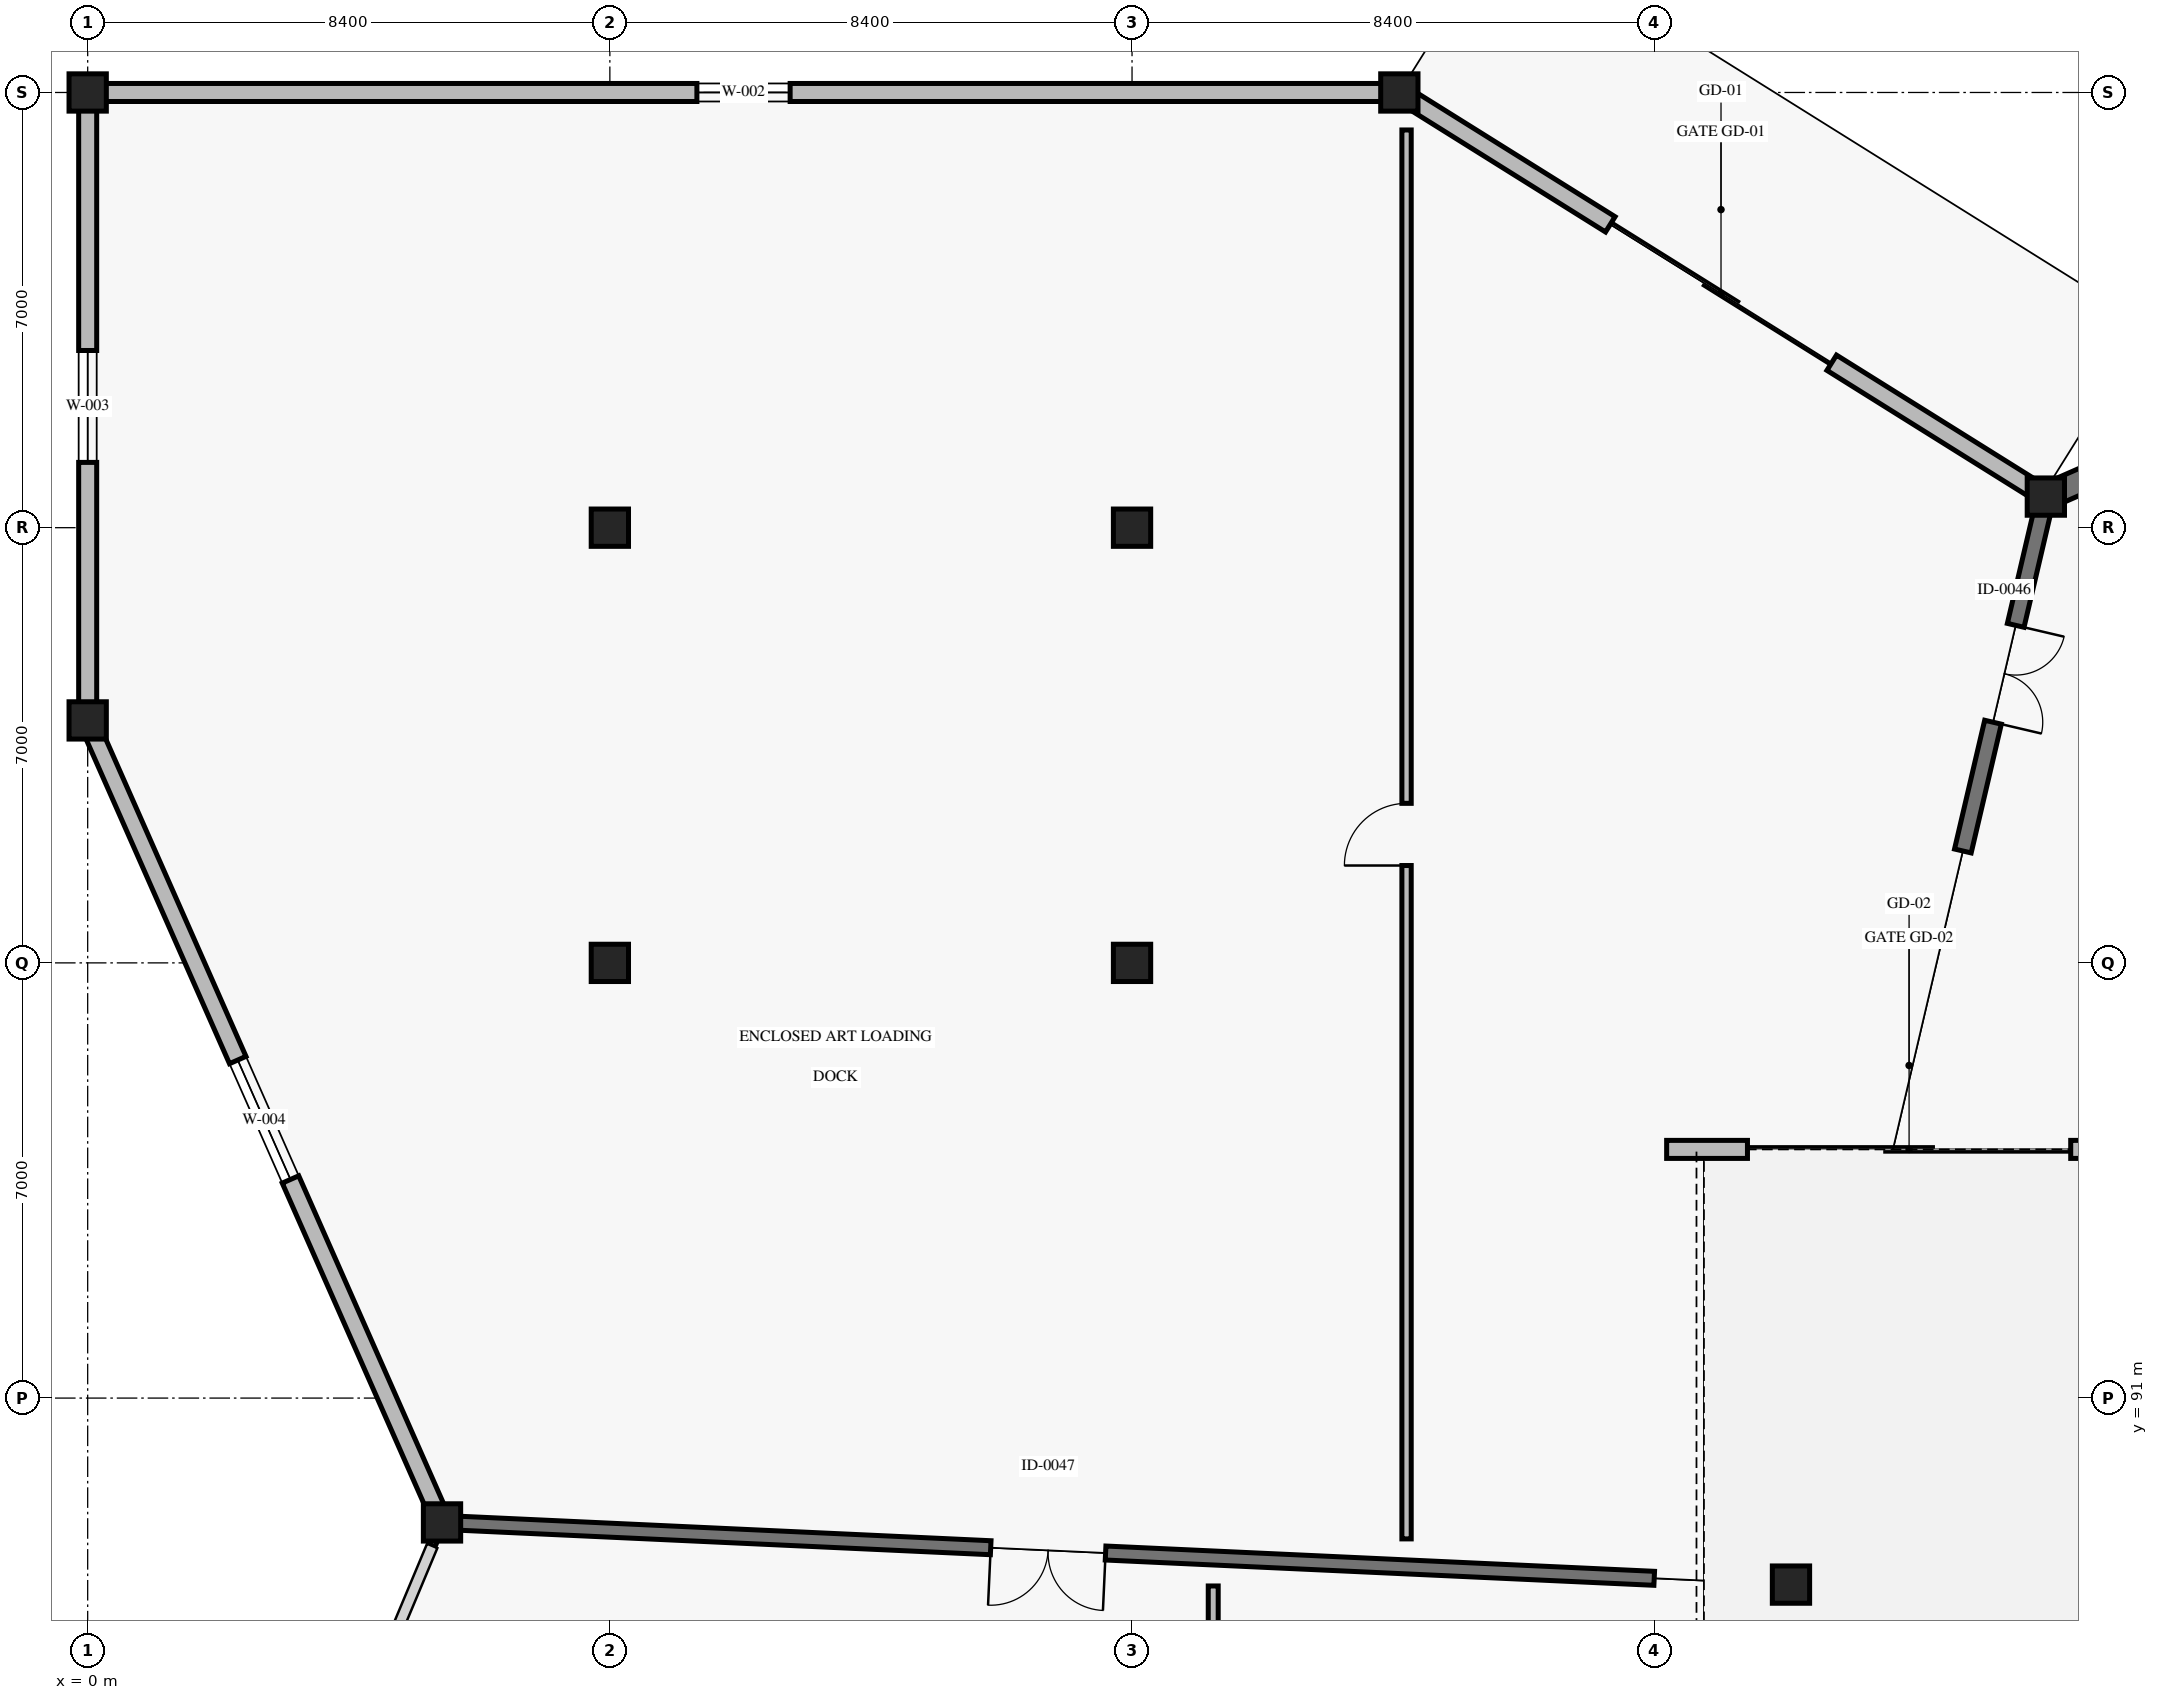
"""IFC4 building model, lengths in metres.
Left out: names, types, materials, properties, quantities, classifications, styles, units other than length and angle.
Written with IfcOpenShell. Run it as: python <this file> out.ifc"""

import sys

from ifc_helpers import new_model, si_unit, direction, frame, frame_2d, origin, origin_2d, place, context, subcontext, project, spatial, rectangle, extrude, element, fill, save


model = new_model("IFC4")
c1 = context("Model", 3, precision=1e-05, world=origin(), true_north=direction((0.0, 1.0)))
c2 = subcontext(c1, "Body", "Model", "MODEL_VIEW")
j1 = project(units=[si_unit("LENGTHUNIT", "METRE"), si_unit("PLANEANGLEUNIT", "RADIAN")], contexts=[c1])
p1 = place(None, origin())
s1 = spatial("IfcSite", under=j1, at=p1, CompositionType="ELEMENT")
p2 = place(p1, origin())
s2 = spatial("IfcBuilding", under=s1, at=p2, CompositionType="ELEMENT")
p3 = place(p2, origin())
s3 = spatial("IfcBuildingStorey", under=s2, at=p3, CompositionType="ELEMENT", Elevation=0.0)
for number, where, z_axis, x_axis in (
    (1, (0.0, 101.9, 0.0), (0.0, 0.0, 1.0), (1.0, 0.0, 0.0)),
    (2, (0.0, 112.0, 0.0), (0.0, 0.0, 1.0), (1.0, 0.0, 0.0)),
    (3, (5.7, 89.0, 0.0), (0.0, 0.0, 1.0), (1.0, 0.0, 0.0)),
    (4, (21.1, 112.0, 0.0), (0.0, 0.0, 1.0), (1.0, 0.0, 0.0)),
    (5, (27.4, 88.0, 0.0), (0.0, 0.0, 1.0), (1.0, 0.0, 0.0)),
    (6, (31.5, 105.5, 0.0), (0.0, 0.0, 1.0), (1.0, 0.0, 0.0)),
    (7, (8.4, 98.0, 0.0), (0.0, 0.0, 1.0), (1.0, 0.0, 0.0)),
    (8, (8.4, 105.0, 0.0), (0.0, 0.0, 1.0), (1.0, 0.0, 0.0)),
    (9, (16.8, 98.0, 0.0), (0.0, 0.0, 1.0), (1.0, 0.0, 0.0)),
    (10, (16.8, 105.0, 0.0), (0.0, 0.0, 1.0), (1.0, 0.0, 0.0)),
):
    element("IfcColumn", number, at=place(p3, frame(where, z_axis=z_axis, x_axis=x_axis)), inside=s3, PredefinedType="COLUMN", context=c2, shape_type="SweptSolid", body=[
        extrude(rectangle(XDim=0.6, YDim=0.6, at=origin_2d()), origin(), (0.0, 0.0, 1.0), 5.4),
    ])
p4 = place(p3, frame((31.555, 105.524, 0.0), z_axis=(0.0, 0.0, 1.0), x_axis=(0.915561631163, 0.402177696474, 0.0)))
e11 = element("IfcWall", 11, at=p4, inside=s3, PredefinedType="SOLIDWALL", context=c2, shape_type="SweptSolid", body=[
    extrude(rectangle(XDim=11.627, YDim=0.4, at=frame_2d((5.813, 0.0))), origin(), (0.0, 0.0, 1.0), 4.22),
])
p5 = place(p3, frame((5.542, 88.622, 0.0), z_axis=(0.0, 0.0, 1.0), x_axis=(0.3862479465, 0.922394993387, 0.0)))
e12 = element("IfcWall", 12, at=p5, inside=s3, PredefinedType="SOLIDWALL", context=c2, shape_type="SweptSolid", body=[
    extrude(rectangle(XDim=0.308, YDim=0.095, at=frame_2d((0.154, 0.0))), origin(), (0.0, 0.0, 1.0), 4.22),
])
p6 = place(p3, frame((21.1, 112.0, 0.0), z_axis=(0.0, 0.0, 1.0), x_axis=(0.84799942789, -0.529997141784, 0.0)))
e13 = element("IfcWall", 13, at=p6, inside=s3, PredefinedType="SOLIDWALL", context=c2, shape_type="SweptSolid", body=[
    extrude(rectangle(XDim=12.204, YDim=0.29, at=frame_2d((6.102, 0.0))), origin(), (0.0, 0.0, 1.0), 4.22),
])
p7 = place(p6, frame((4.002, 0.0, 0.0)))
e14 = element("IfcOpeningElement", 14, at=p7, cuts=e13, PredefinedType="OPENING", context=c2, shape_type="SweptSolid", body=[
    extrude(rectangle(XDim=4.2, YDim=3.92, at=frame_2d((2.1, 1.96))), frame((0.0, 0.155, 0.0), z_axis=(0.0, -1.0, 0.0), x_axis=(1.0, 0.0, 0.0)), (0.0, 0.0, 1.0), 0.31),
])
p8 = place(p3, frame((0.0, 112.0, 0.0), z_axis=(0.0, 0.0, 1.0), x_axis=(1.0, 0.0, 0.0)))
e15 = element("IfcWall", 15, at=p8, inside=s3, PredefinedType="SOLIDWALL", context=c2, shape_type="SweptSolid", body=[
    extrude(rectangle(XDim=21.1, YDim=0.29, at=frame_2d((10.55, 0.0))), origin(), (0.0, 0.0, 1.0), 4.22),
])
p9 = place(p8, frame((9.8, 0.0, 0.95)))
e16 = element("IfcOpeningElement", 16, at=p9, cuts=e15, PredefinedType="OPENING", context=c2, shape_type="SweptSolid", body=[
    extrude(rectangle(XDim=1.5, YDim=1.8, at=frame_2d((0.75, 0.9))), frame((0.0, 0.155, 0.0), z_axis=(0.0, -1.0, 0.0), x_axis=(1.0, 0.0, 0.0)), (0.0, 0.0, 1.0), 0.31),
])
p10 = place(p3, frame((0.0, 101.9, 0.0), z_axis=(0.0, 0.0, 1.0), x_axis=(0.0, 1.0, 0.0)))
e17 = element("IfcWall", 17, at=p10, inside=s3, PredefinedType="SOLIDWALL", context=c2, shape_type="SweptSolid", body=[
    extrude(rectangle(XDim=10.1, YDim=0.29, at=frame_2d((5.05, 0.0))), origin(), (0.0, 0.0, 1.0), 4.22),
])
p11 = place(p10, frame((4.15, 0.0, 0.95)))
e18 = element("IfcOpeningElement", 18, at=p11, cuts=e17, PredefinedType="OPENING", context=c2, shape_type="SweptSolid", body=[
    extrude(rectangle(XDim=1.8, YDim=1.8, at=frame_2d((0.9, 0.9))), frame((0.0, 0.155, 0.0), z_axis=(0.0, -1.0, 0.0), x_axis=(1.0, 0.0, 0.0)), (0.0, 0.0, 1.0), 0.31),
])
p12 = place(p3, frame((5.676, 89.055, 0.0), z_axis=(0.0, 0.0, 1.0), x_axis=(-0.404184143846, 0.914677636035, 0.0)))
e19 = element("IfcWall", 19, at=p12, inside=s3, PredefinedType="SOLIDWALL", context=c2, shape_type="SweptSolid", body=[
    extrude(rectangle(XDim=14.043, YDim=0.29, at=frame_2d((7.021, 0.0))), origin(), (0.0, 0.0, 1.0), 4.22),
])
p13 = place(p12, frame((5.971, 0.0, 0.95)))
e20 = element("IfcOpeningElement", 20, at=p13, cuts=e19, PredefinedType="OPENING", context=c2, shape_type="SweptSolid", body=[
    extrude(rectangle(XDim=2.1, YDim=1.8, at=frame_2d((1.05, 0.9))), frame((0.0, 0.155, 0.0), z_axis=(0.0, -1.0, 0.0), x_axis=(1.0, 0.0, 0.0)), (0.0, 0.0, 1.0), 0.31),
])
p14 = place(p3, frame((33.0, 95.0, 0.0), z_axis=(0.0, 0.0, 1.0), x_axis=(-1.0, 0.0, 0.0)))
e21 = element("IfcWall", 21, at=p14, inside=s3, PredefinedType="SOLIDWALL", context=c2, shape_type="SweptSolid", body=[
    extrude(rectangle(XDim=7.6, YDim=0.29, at=frame_2d((3.8, 0.0))), origin(), (0.0, 0.0, 1.0), 3.8),
])
p15 = place(p14, frame((1.1, 0.0, 0.0)))
e22 = element("IfcOpeningElement", 22, at=p15, cuts=e21, PredefinedType="OPENING", context=c2, shape_type="SweptSolid", body=[
    extrude(rectangle(XDim=5.2, YDim=2.8, at=frame_2d((2.6, 1.4))), frame((0.0, 0.155, 0.0), z_axis=(0.0, -1.0, 0.0), x_axis=(1.0, 0.0, 0.0)), (0.0, 0.0, 1.0), 0.31),
])
p16 = place(p3, frame((31.5, 105.5, 0.0), z_axis=(0.0, 0.0, 1.0), x_axis=(-0.228035044918, -0.973652924963, 0.0)))
e23 = element("IfcWall", 23, at=p16, inside=s3, PredefinedType="SOLIDWALL", context=c2, shape_type="SweptSolid", body=[
    extrude(rectangle(XDim=5.854, YDim=0.275, at=frame_2d((2.927, 0.0))), origin(), (0.0, 0.0, 1.0), 4.62),
])
p17 = place(p16, frame((2.127, 0.0, 0.0)))
e24 = element("IfcOpeningElement", 24, at=p17, cuts=e23, PredefinedType="OPENING", context=c2, shape_type="SweptSolid", body=[
    extrude(rectangle(XDim=1.6, YDim=2.45, at=frame_2d((0.8, 1.225))), frame((0.0, 0.147, 0.0), z_axis=(0.0, -1.0, 0.0), x_axis=(1.0, 0.0, 0.0)), (0.0, 0.0, 1.0), 0.295),
])
p18 = place(p3, frame((25.2, 88.101, 0.0), z_axis=(0.0, 0.0, 1.0), x_axis=(-0.998939142773, 0.046049853812, 0.0)))
e25 = element("IfcWall", 25, at=p18, inside=s3, PredefinedType="SOLIDWALL", context=c2, shape_type="SweptSolid", body=[
    extrude(rectangle(XDim=19.521, YDim=0.225, at=frame_2d((9.76, 0.0))), origin(), (0.0, 0.0, 1.0), 4.62),
])
p19 = place(p18, frame((8.835, 0.0, 0.0)))
e26 = element("IfcOpeningElement", 26, at=p19, cuts=e25, PredefinedType="OPENING", context=c2, shape_type="SweptSolid", body=[
    extrude(rectangle(XDim=1.85, YDim=2.4, at=frame_2d((0.925, 1.2))), frame((0.0, 0.123, 0.0), z_axis=(0.0, -1.0, 0.0), x_axis=(1.0, 0.0, 0.0)), (0.0, 0.0, 1.0), 0.245),
])
p20 = place(p3, frame((18.106, 81.6, 0.0), z_axis=(0.0, 0.0, 1.0), x_axis=(0.0, 1.0, 0.0)))
e27 = element("IfcWall", 27, at=p20, inside=s3, PredefinedType="PARTITIONING", context=c2, shape_type="SweptSolid", body=[
    extrude(rectangle(XDim=6.378, YDim=0.16, at=frame_2d((3.189, 0.0))), origin(), (0.0, 0.0, 1.0), 3.92),
])
p21 = place(p20, frame((3.509, 0.0, 0.0)))
e28 = element("IfcOpeningElement", 28, at=p21, cuts=e27, PredefinedType="OPENING", context=c2, shape_type="SweptSolid", body=[
    extrude(rectangle(XDim=0.98, YDim=2.15, at=frame_2d((0.49, 1.075))), frame((0.0, 0.09, 0.0), z_axis=(0.0, -1.0, 0.0), x_axis=(1.0, 0.0, 0.0)), (0.0, 0.0, 1.0), 0.18),
])
p22 = place(p3, frame((21.216, 88.735, 0.0), z_axis=(0.0, 0.0, 1.0), x_axis=(0.0, 1.0, 0.0)))
e29 = element("IfcWall", 29, at=p22, inside=s3, PredefinedType="PARTITIONING", context=c2, shape_type="SweptSolid", body=[
    extrude(rectangle(XDim=22.662, YDim=0.15, at=frame_2d((11.331, 0.0))), origin(), (0.0, 0.0, 1.0), 3.92),
])
p23 = place(p22, frame((10.831, 0.0, 0.0)))
e30 = element("IfcOpeningElement", 30, at=p23, cuts=e29, PredefinedType="OPENING", context=c2, shape_type="SweptSolid", body=[
    extrude(rectangle(XDim=1.0, YDim=2.15, at=frame_2d((0.5, 1.075))), frame((0.0, 0.085, 0.0), z_axis=(0.0, -1.0, 0.0), x_axis=(1.0, 0.0, 0.0)), (0.0, 0.0, 1.0), 0.17),
])
p24 = place(p7, origin())
e31 = element("IfcDoor", 31, at=p24, inside=s3, OperationType="ROLLINGUP", PredefinedType="GATE", context=c2, shape_type="SweptSolid", body=[
    extrude(rectangle(XDim=4.2, YDim=3.92, at=frame_2d((2.1, 1.96))), frame((0.0, 0.025, 0.0), z_axis=(0.0, -1.0, 0.0), x_axis=(1.0, 0.0, 0.0)), (0.0, 0.0, 1.0), 0.05),
])
fill(e14, e31)
p25 = place(p9, origin())
e32 = element("IfcWindow", 32, at=p25, inside=s3, PartitioningType="SINGLE_PANEL", PredefinedType="WINDOW", context=c2, shape_type="SweptSolid", body=[
    extrude(rectangle(XDim=1.5, YDim=1.8, at=frame_2d((0.75, 0.9))), frame((0.0, 0.03, 0.0), z_axis=(0.0, -1.0, 0.0), x_axis=(1.0, 0.0, 0.0)), (0.0, 0.0, 1.0), 0.06),
])
fill(e16, e32)
p26 = place(p11, origin())
e33 = element("IfcWindow", 33, at=p26, inside=s3, PartitioningType="SINGLE_PANEL", PredefinedType="WINDOW", context=c2, shape_type="SweptSolid", body=[
    extrude(rectangle(XDim=1.8, YDim=1.8, at=frame_2d((0.9, 0.9))), frame((0.0, 0.03, 0.0), z_axis=(0.0, -1.0, 0.0), x_axis=(1.0, 0.0, 0.0)), (0.0, 0.0, 1.0), 0.06),
])
fill(e18, e33)
p27 = place(p13, origin())
e34 = element("IfcWindow", 34, at=p27, inside=s3, PartitioningType="SINGLE_PANEL", PredefinedType="WINDOW", context=c2, shape_type="SweptSolid", body=[
    extrude(rectangle(XDim=2.1, YDim=1.8, at=frame_2d((1.05, 0.9))), frame((0.0, 0.03, 0.0), z_axis=(0.0, -1.0, 0.0), x_axis=(1.0, 0.0, 0.0)), (0.0, 0.0, 1.0), 0.06),
])
fill(e20, e34)
p28 = place(p15, origin())
e35 = element("IfcDoor", 35, at=p28, inside=s3, OperationType="ROLLINGUP", PredefinedType="GATE", context=c2, shape_type="SweptSolid", body=[
    extrude(rectangle(XDim=5.2, YDim=2.8, at=frame_2d((2.6, 1.4))), frame((0.0, 0.025, 0.0), z_axis=(0.0, -1.0, 0.0), x_axis=(1.0, 0.0, 0.0)), (0.0, 0.0, 1.0), 0.05),
])
fill(e22, e35)
p29 = place(p17, origin())
e36 = element("IfcDoor", 36, at=p29, inside=s3, OperationType="DOUBLE_DOOR_SINGLE_SWING", PredefinedType="DOOR", context=c2, shape_type="SweptSolid", body=[
    extrude(rectangle(XDim=1.6, YDim=2.45, at=frame_2d((0.8, 1.225))), frame((0.0, 0.025, 0.0), z_axis=(0.0, -1.0, 0.0), x_axis=(1.0, 0.0, 0.0)), (0.0, 0.0, 1.0), 0.05),
])
fill(e24, e36)
p30 = place(p19, origin())
e37 = element("IfcDoor", 37, at=p30, inside=s3, OperationType="DOUBLE_DOOR_SINGLE_SWING", PredefinedType="DOOR", context=c2, shape_type="SweptSolid", body=[
    extrude(rectangle(XDim=1.85, YDim=2.4, at=frame_2d((0.925, 1.2))), frame((0.0, 0.025, 0.0), z_axis=(0.0, -1.0, 0.0), x_axis=(1.0, 0.0, 0.0)), (0.0, 0.0, 1.0), 0.05),
])
fill(e26, e37)
p31 = place(p23, origin())
e38 = element("IfcDoor", 38, at=p31, inside=s3, OperationType="SINGLE_SWING_LEFT", PredefinedType="DOOR", context=c2, shape_type="SweptSolid", body=[
    extrude(rectangle(XDim=1.0, YDim=2.15, at=frame_2d((0.5, 1.075))), frame((0.0, 0.025, 0.0), z_axis=(0.0, -1.0, 0.0), x_axis=(1.0, 0.0, 0.0)), (0.0, 0.0, 1.0), 0.05),
])
fill(e30, e38)
save(model, sys.argv[1])
